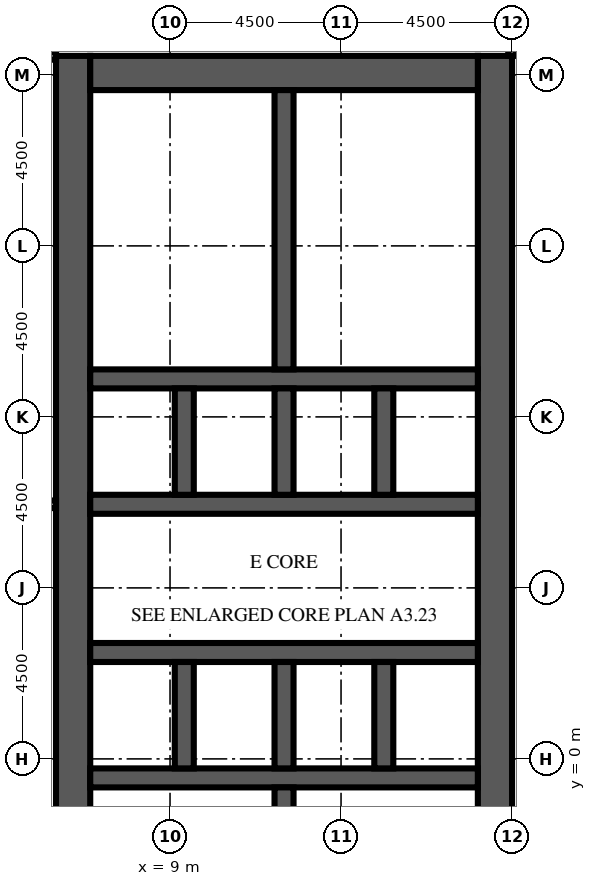
"""IFC4 building model, lengths in metres.
Left out: names, types, materials, properties, quantities, classifications, styles, units other than length and angle.
Written with IfcOpenShell. Run it as: python <this file> out.ifc"""

import sys

from ifc_helpers import new_model, si_unit, direction, frame, frame_2d, origin, place, context, subcontext, project, spatial, rectangle, extrude, element, fill, save


model = new_model("IFC4")
c1 = context("Model", 3, precision=1e-05, world=origin(), true_north=direction((0.0, 1.0)))
c2 = subcontext(c1, "Body", "Model", "MODEL_VIEW")
j1 = project(units=[si_unit("LENGTHUNIT", "METRE"), si_unit("PLANEANGLEUNIT", "RADIAN")], contexts=[c1])
p1 = place(None, origin())
s1 = spatial("IfcSite", under=j1, at=p1, CompositionType="ELEMENT")
p2 = place(p1, origin())
s2 = spatial("IfcBuilding", under=s1, at=p2, CompositionType="ELEMENT")
p3 = place(p2, frame((0.0, 0.0, 145.4)))
s3 = spatial("IfcBuildingStorey", under=s2, at=p3, CompositionType="ELEMENT", Elevation=145.4)
p4 = place(p3, frame((6.45, -9.0, 0.0), z_axis=(0.0, 0.0, 1.0), x_axis=(0.0, 1.0, 0.0)))
e1 = element("IfcWall", 1, at=p4, inside=s3, PredefinedType="SHEAR", context=c2, shape_type="SweptSolid", body=[
    extrude(rectangle(XDim=27.5, YDim=0.9, at=frame_2d((13.75, 0.0))), origin(), (0.0, 0.0, 1.0), 6.0),
])
p5 = place(p4, frame((12.55, 0.0, 0.0)))
e2 = element("IfcOpeningElement", 2, at=p5, cuts=e1, PredefinedType="OPENING", context=c2, shape_type="SweptSolid", body=[
    extrude(rectangle(XDim=2.4, YDim=2.4, at=frame_2d((1.2, 1.2))), frame((0.0, 0.46, 0.0), z_axis=(0.0, -1.0, 0.0), x_axis=(1.0, 0.0, 0.0)), (0.0, 0.0, 1.0), 0.92),
])
p6 = place(p4, frame((5.51, 0.0, 0.0)))
e3 = element("IfcOpeningElement", 3, at=p6, cuts=e1, PredefinedType="OPENING", context=c2, shape_type="SweptSolid", body=[
    extrude(rectangle(XDim=0.923, YDim=2.1, at=frame_2d((0.461, 1.05))), frame((0.0, 0.46, 0.0), z_axis=(0.0, -1.0, 0.0), x_axis=(1.0, 0.0, 0.0)), (0.0, 0.0, 1.0), 0.92),
])
p7 = place(p4, frame((23.427, 0.0, 0.0)))
e4 = element("IfcOpeningElement", 4, at=p7, cuts=e1, PredefinedType="OPENING", context=c2, shape_type="SweptSolid", body=[
    extrude(rectangle(XDim=1.2, YDim=2.1, at=frame_2d((0.6, 1.05))), frame((0.0, 0.46, 0.0), z_axis=(0.0, -1.0, 0.0), x_axis=(1.0, 0.0, 0.0)), (0.0, 0.0, 1.0), 0.92),
])
p8 = place(p3, frame((17.55, -9.0, 0.0), z_axis=(0.0, 0.0, 1.0), x_axis=(0.0, 1.0, 0.0)))
e5 = element("IfcWall", 5, at=p8, inside=s3, PredefinedType="SHEAR", context=c2, shape_type="SweptSolid", body=[
    extrude(rectangle(XDim=27.5, YDim=0.9, at=frame_2d((13.75, 0.0))), origin(), (0.0, 0.0, 1.0), 6.0),
])
p9 = place(p8, frame((12.55, 0.0, 0.0)))
e6 = element("IfcOpeningElement", 6, at=p9, cuts=e5, PredefinedType="OPENING", context=c2, shape_type="SweptSolid", body=[
    extrude(rectangle(XDim=2.4, YDim=2.4, at=frame_2d((1.2, 1.2))), frame((0.0, 0.46, 0.0), z_axis=(0.0, -1.0, 0.0), x_axis=(1.0, 0.0, 0.0)), (0.0, 0.0, 1.0), 0.92),
])
p10 = place(p8, frame((6.825, 0.0, 0.0)))
e7 = element("IfcOpeningElement", 7, at=p10, cuts=e5, PredefinedType="OPENING", context=c2, shape_type="SweptSolid", body=[
    extrude(rectangle(XDim=1.2, YDim=2.1, at=frame_2d((0.6, 1.05))), frame((0.0, 0.46, 0.0), z_axis=(0.0, -1.0, 0.0), x_axis=(1.0, 0.0, 0.0)), (0.0, 0.0, 1.0), 0.92),
])
p11 = place(p8, frame((19.475, 0.0, 0.0)))
e8 = element("IfcOpeningElement", 8, at=p11, cuts=e5, PredefinedType="OPENING", context=c2, shape_type="SweptSolid", body=[
    extrude(rectangle(XDim=1.2, YDim=2.1, at=frame_2d((0.6, 1.05))), frame((0.0, 0.46, 0.0), z_axis=(0.0, -1.0, 0.0), x_axis=(1.0, 0.0, 0.0)), (0.0, 0.0, 1.0), 0.92),
])
p12 = place(p3, frame((6.9, 18.05, 0.0), z_axis=(0.0, 0.0, 1.0), x_axis=(1.0, 0.0, 0.0)))
e9 = element("IfcWall", 9, at=p12, inside=s3, PredefinedType="SHEAR", context=c2, shape_type="SweptSolid", body=[
    extrude(rectangle(XDim=10.2, YDim=0.9, at=frame_2d((5.1, 0.0))), origin(), (0.0, 0.0, 1.0), 6.0),
])
p13 = place(p3, frame((6.9, -0.5, 0.0), z_axis=(0.0, 0.0, 1.0), x_axis=(1.0, 0.0, 0.0)))
e10 = element("IfcWall", 10, at=p13, inside=s3, PredefinedType="SHEAR", context=c2, shape_type="SweptSolid", body=[
    extrude(rectangle(XDim=10.2, YDim=0.5, at=frame_2d((5.1, 0.0))), origin(), (0.0, 0.0, 1.0), 6.0),
])
p14 = place(p3, frame((6.9, 2.8, 0.0), z_axis=(0.0, 0.0, 1.0), x_axis=(1.0, 0.0, 0.0)))
e11 = element("IfcWall", 11, at=p14, inside=s3, PredefinedType="SHEAR", context=c2, shape_type="SweptSolid", body=[
    extrude(rectangle(XDim=10.2, YDim=0.5, at=frame_2d((5.1, 0.0))), origin(), (0.0, 0.0, 1.0), 6.0),
])
p15 = place(p14, frame((0.562, 0.0, 0.0)))
e12 = element("IfcOpeningElement", 12, at=p15, cuts=e11, PredefinedType="OPENING", context=c2, shape_type="SweptSolid", body=[
    extrude(rectangle(XDim=1.1, YDim=2.1, at=frame_2d((0.55, 1.05))), frame((0.0, 0.26, 0.0), z_axis=(0.0, -1.0, 0.0), x_axis=(1.0, 0.0, 0.0)), (0.0, 0.0, 1.0), 0.52),
])
p16 = place(p14, frame((3.238, 0.0, 0.0)))
e13 = element("IfcOpeningElement", 13, at=p16, cuts=e11, PredefinedType="OPENING", context=c2, shape_type="SweptSolid", body=[
    extrude(rectangle(XDim=1.1, YDim=2.1, at=frame_2d((0.55, 1.05))), frame((0.0, 0.26, 0.0), z_axis=(0.0, -1.0, 0.0), x_axis=(1.0, 0.0, 0.0)), (0.0, 0.0, 1.0), 0.52),
])
p17 = place(p14, frame((8.538, 0.0, 0.0)))
e14 = element("IfcOpeningElement", 14, at=p17, cuts=e11, PredefinedType="OPENING", context=c2, shape_type="SweptSolid", body=[
    extrude(rectangle(XDim=1.1, YDim=2.1, at=frame_2d((0.55, 1.05))), frame((0.0, 0.26, 0.0), z_axis=(0.0, -1.0, 0.0), x_axis=(1.0, 0.0, 0.0)), (0.0, 0.0, 1.0), 0.52),
])
p18 = place(p3, frame((6.9, 6.7, 0.0), z_axis=(0.0, 0.0, 1.0), x_axis=(1.0, 0.0, 0.0)))
e15 = element("IfcWall", 15, at=p18, inside=s3, PredefinedType="SHEAR", context=c2, shape_type="SweptSolid", body=[
    extrude(rectangle(XDim=10.2, YDim=0.5, at=frame_2d((5.1, 0.0))), origin(), (0.0, 0.0, 1.0), 6.0),
])
p19 = place(p18, frame((0.562, 0.0, 0.0)))
e16 = element("IfcOpeningElement", 16, at=p19, cuts=e15, PredefinedType="OPENING", context=c2, shape_type="SweptSolid", body=[
    extrude(rectangle(XDim=1.1, YDim=2.1, at=frame_2d((0.55, 1.05))), frame((0.0, 0.26, 0.0), z_axis=(0.0, -1.0, 0.0), x_axis=(1.0, 0.0, 0.0)), (0.0, 0.0, 1.0), 0.52),
])
p20 = place(p18, frame((3.288, 0.0, 0.0)))
e17 = element("IfcOpeningElement", 17, at=p20, cuts=e15, PredefinedType="OPENING", context=c2, shape_type="SweptSolid", body=[
    extrude(rectangle(XDim=1.0, YDim=2.1, at=frame_2d((0.5, 1.05))), frame((0.0, 0.26, 0.0), z_axis=(0.0, -1.0, 0.0), x_axis=(1.0, 0.0, 0.0)), (0.0, 0.0, 1.0), 0.52),
])
p21 = place(p18, frame((5.913, 0.0, 0.0)))
e18 = element("IfcOpeningElement", 18, at=p21, cuts=e15, PredefinedType="OPENING", context=c2, shape_type="SweptSolid", body=[
    extrude(rectangle(XDim=1.0, YDim=2.1, at=frame_2d((0.5, 1.05))), frame((0.0, 0.26, 0.0), z_axis=(0.0, -1.0, 0.0), x_axis=(1.0, 0.0, 0.0)), (0.0, 0.0, 1.0), 0.52),
])
p22 = place(p18, frame((8.587, 0.0, 0.0)))
e19 = element("IfcOpeningElement", 19, at=p22, cuts=e15, PredefinedType="OPENING", context=c2, shape_type="SweptSolid", body=[
    extrude(rectangle(XDim=1.0, YDim=2.1, at=frame_2d((0.5, 1.05))), frame((0.0, 0.26, 0.0), z_axis=(0.0, -1.0, 0.0), x_axis=(1.0, 0.0, 0.0)), (0.0, 0.0, 1.0), 0.52),
])
p23 = place(p3, frame((6.9, 10.0, 0.0), z_axis=(0.0, 0.0, 1.0), x_axis=(1.0, 0.0, 0.0)))
e20 = element("IfcWall", 20, at=p23, inside=s3, PredefinedType="SHEAR", context=c2, shape_type="SweptSolid", body=[
    extrude(rectangle(XDim=10.2, YDim=0.5, at=frame_2d((5.1, 0.0))), origin(), (0.0, 0.0, 1.0), 6.0),
])
for number, where, z_axis, x_axis in (
    (21, (9.375, -0.25, 0.0), (0.0, 0.0, 1.0), (0.0, 1.0, 0.0)),
    (22, (9.375, 6.95, 0.0), (0.0, 0.0, 1.0), (0.0, 1.0, 0.0)),
    (23, (12.0, -0.25, 0.0), (0.0, 0.0, 1.0), (0.0, 1.0, 0.0)),
    (24, (12.0, 6.95, 0.0), (0.0, 0.0, 1.0), (0.0, 1.0, 0.0)),
    (25, (14.625, -0.25, 0.0), (0.0, 0.0, 1.0), (0.0, 1.0, 0.0)),
    (26, (14.625, 6.95, 0.0), (0.0, 0.0, 1.0), (0.0, 1.0, 0.0)),
):
    element("IfcWall", number, at=place(p3, frame(where, z_axis=z_axis, x_axis=x_axis)), inside=s3, PredefinedType="SHEAR", context=c2, shape_type="SweptSolid", body=[
        extrude(rectangle(XDim=2.8, YDim=0.5, at=frame_2d((1.4, 0.0))), origin(), (0.0, 0.0, 1.0), 6.0),
    ])
for number, where, z_axis, x_axis in (
    (27, (12.0, -8.1, 0.0), (0.0, 0.0, 1.0), (0.0, 1.0, 0.0)),
    (28, (12.0, 10.25, 0.0), (0.0, 0.0, 1.0), (0.0, 1.0, 0.0)),
):
    element("IfcWall", number, at=place(p3, frame(where, z_axis=z_axis, x_axis=x_axis)), inside=s3, PredefinedType="SHEAR", context=c2, shape_type="SweptSolid", body=[
        extrude(rectangle(XDim=7.35, YDim=0.5, at=frame_2d((3.675, 0.0))), origin(), (0.0, 0.0, 1.0), 6.0),
    ])
p24 = place(p3, frame((9.325, -2.367, 0.0), z_axis=(0.0, 0.0, 1.0), x_axis=(0.0, 1.0, 0.0)))
e29 = element("IfcWall", 29, at=p24, inside=s3, PredefinedType="PARTITIONING", context=c2, shape_type="SweptSolid", body=[
    extrude(rectangle(XDim=1.617, YDim=0.1, at=frame_2d((0.809, 0.0))), origin(), (0.0, 0.0, 1.0), 5.4),
])
p25 = place(p3, frame((6.9, 12.455, 0.0), z_axis=(0.0, 0.0, 1.0), x_axis=(1.0, 0.0, 0.0)))
e30 = element("IfcWall", 30, at=p25, inside=s3, PredefinedType="PARTITIONING", context=c2, shape_type="SweptSolid", body=[
    extrude(rectangle(XDim=1.3, YDim=0.1, at=frame_2d((0.65, 0.0))), origin(), (0.0, 0.0, 1.0), 5.4),
])
p26 = place(p25, frame((0.2, 0.0, 0.0)))
e31 = element("IfcOpeningElement", 31, at=p26, cuts=e30, PredefinedType="OPENING", context=c2, shape_type="SweptSolid", body=[
    extrude(rectangle(XDim=0.9, YDim=2.1, at=frame_2d((0.45, 1.05))), frame((0.0, 0.06, 0.0), z_axis=(0.0, -1.0, 0.0), x_axis=(1.0, 0.0, 0.0)), (0.0, 0.0, 1.0), 0.12),
])
p27 = place(p3, frame((8.2, 12.455, 0.0), z_axis=(0.0, 0.0, 1.0), x_axis=(1.0, 0.0, 0.0)))
e32 = element("IfcWall", 32, at=p27, inside=s3, PredefinedType="PARTITIONING", context=c2, shape_type="SweptSolid", body=[
    extrude(rectangle(XDim=3.55, YDim=0.1, at=frame_2d((1.775, 0.0))), origin(), (0.0, 0.0, 1.0), 5.4),
])
p28 = place(p3, frame((8.2, 12.455, 0.0), z_axis=(0.0, 0.0, 1.0), x_axis=(0.0, 1.0, 0.0)))
e33 = element("IfcWall", 33, at=p28, inside=s3, PredefinedType="PARTITIONING", context=c2, shape_type="SweptSolid", body=[
    extrude(rectangle(XDim=2.573, YDim=0.1, at=frame_2d((1.286, 0.0))), origin(), (0.0, 0.0, 1.0), 5.4),
])
p29 = place(p28, frame((0.786, 0.0, 0.0)))
e34 = element("IfcOpeningElement", 34, at=p29, cuts=e33, PredefinedType="OPENING", context=c2, shape_type="SweptSolid", body=[
    extrude(rectangle(XDim=1.0, YDim=2.1, at=frame_2d((0.5, 1.05))), frame((0.0, 0.06, 0.0), z_axis=(0.0, -1.0, 0.0), x_axis=(1.0, 0.0, 0.0)), (0.0, 0.0, 1.0), 0.12),
])
p30 = place(p3, frame((8.2, 15.028, 0.0), z_axis=(0.0, 0.0, 1.0), x_axis=(0.0, 1.0, 0.0)))
e35 = element("IfcWall", 35, at=p30, inside=s3, PredefinedType="PARTITIONING", context=c2, shape_type="SweptSolid", body=[
    extrude(rectangle(XDim=2.573, YDim=0.1, at=frame_2d((1.286, 0.0))), origin(), (0.0, 0.0, 1.0), 5.4),
])
p31 = place(p30, frame((0.786, 0.0, 0.0)))
e36 = element("IfcOpeningElement", 36, at=p31, cuts=e35, PredefinedType="OPENING", context=c2, shape_type="SweptSolid", body=[
    extrude(rectangle(XDim=1.0, YDim=2.1, at=frame_2d((0.5, 1.05))), frame((0.0, 0.06, 0.0), z_axis=(0.0, -1.0, 0.0), x_axis=(1.0, 0.0, 0.0)), (0.0, 0.0, 1.0), 0.12),
])
p32 = place(p3, frame((8.2, 15.028, 0.0), z_axis=(0.0, 0.0, 1.0), x_axis=(1.0, 0.0, 0.0)))
e37 = element("IfcWall", 37, at=p32, inside=s3, PredefinedType="PARTITIONING", context=c2, shape_type="SweptSolid", body=[
    extrude(rectangle(XDim=3.55, YDim=0.1, at=frame_2d((1.775, 0.0))), origin(), (0.0, 0.0, 1.0), 5.4),
])
p33 = place(p3, frame((18.0, 18.5, 0.0), z_axis=(0.0, 0.0, 1.0), x_axis=(0.0, 1.0, 0.0)))
e38 = element("IfcWall", 38, at=p33, inside=s3, PredefinedType="PARTITIONING", context=c2, shape_type="SweptSolid", body=[
    extrude(rectangle(XDim=3.3, YDim=0.2, at=frame_2d((1.65, 0.0))), origin(), (0.0, 0.0, 1.0), 5.4),
])
p34 = place(p3, frame((1.5, 6.7, 0.0), z_axis=(0.0, 0.0, 1.0), x_axis=(1.0, 0.0, 0.0)))
e39 = element("IfcWall", 39, at=p34, inside=s3, PredefinedType="PARTITIONING", context=c2, shape_type="SweptSolid", body=[
    extrude(rectangle(XDim=4.5, YDim=0.2, at=frame_2d((2.25, 0.0))), origin(), (0.0, 0.0, 1.0), 5.4),
])
p35 = place(p34, frame((1.6, 0.0, 0.0)))
e40 = element("IfcOpeningElement", 40, at=p35, cuts=e39, PredefinedType="OPENING", context=c2, shape_type="SweptSolid", body=[
    extrude(rectangle(XDim=1.0, YDim=2.1, at=frame_2d((0.5, 1.05))), frame((0.0, 0.11, 0.0), z_axis=(0.0, -1.0, 0.0), x_axis=(1.0, 0.0, 0.0)), (0.0, 0.0, 1.0), 0.22),
])
p36 = place(p3, frame((1.5, 18.5, 0.0), z_axis=(0.0, 0.0, 1.0), x_axis=(1.0, 0.0, 0.0)))
e41 = element("IfcWall", 41, at=p36, inside=s3, PredefinedType="PARTITIONING", context=c2, shape_type="SweptSolid", body=[
    extrude(rectangle(XDim=4.5, YDim=0.2, at=frame_2d((2.25, 0.0))), origin(), (0.0, 0.0, 1.0), 5.4),
])
p37 = place(p15, origin())
e42 = element("IfcDoor", 42, at=p37, inside=s3, OperationType="DOUBLE_DOOR_SLIDING", PredefinedType="DOOR", context=c2, shape_type="SweptSolid", body=[
    extrude(rectangle(XDim=1.1, YDim=2.1, at=frame_2d((0.55, 1.05))), frame((0.0, 0.025, 0.0), z_axis=(0.0, -1.0, 0.0), x_axis=(1.0, 0.0, 0.0)), (0.0, 0.0, 1.0), 0.05),
])
fill(e12, e42)
p38 = place(p16, origin())
e43 = element("IfcDoor", 43, at=p38, inside=s3, OperationType="DOUBLE_DOOR_SLIDING", PredefinedType="DOOR", context=c2, shape_type="SweptSolid", body=[
    extrude(rectangle(XDim=1.1, YDim=2.1, at=frame_2d((0.55, 1.05))), frame((0.0, 0.025, 0.0), z_axis=(0.0, -1.0, 0.0), x_axis=(1.0, 0.0, 0.0)), (0.0, 0.0, 1.0), 0.05),
])
fill(e13, e43)
p39 = place(p17, origin())
e44 = element("IfcDoor", 44, at=p39, inside=s3, OperationType="DOUBLE_DOOR_SLIDING", PredefinedType="DOOR", context=c2, shape_type="SweptSolid", body=[
    extrude(rectangle(XDim=1.1, YDim=2.1, at=frame_2d((0.55, 1.05))), frame((0.0, 0.025, 0.0), z_axis=(0.0, -1.0, 0.0), x_axis=(1.0, 0.0, 0.0)), (0.0, 0.0, 1.0), 0.05),
])
fill(e14, e44)
p40 = place(p19, origin())
e45 = element("IfcDoor", 45, at=p40, inside=s3, OperationType="DOUBLE_DOOR_SLIDING", PredefinedType="DOOR", context=c2, shape_type="SweptSolid", body=[
    extrude(rectangle(XDim=1.1, YDim=2.1, at=frame_2d((0.55, 1.05))), frame((0.0, 0.025, 0.0), z_axis=(0.0, -1.0, 0.0), x_axis=(1.0, 0.0, 0.0)), (0.0, 0.0, 1.0), 0.05),
])
fill(e16, e45)
p41 = place(p5, origin())
e46 = element("IfcDoor", 46, at=p41, inside=s3, OperationType="DOUBLE_DOOR_DOUBLE_SWING", PredefinedType="DOOR", context=c2, shape_type="SweptSolid", body=[
    extrude(rectangle(XDim=2.4, YDim=2.4, at=frame_2d((1.2, 1.2))), frame((0.0, 0.025, 0.0), z_axis=(0.0, -1.0, 0.0), x_axis=(1.0, 0.0, 0.0)), (0.0, 0.0, 1.0), 0.05),
])
fill(e2, e46)
p42 = place(p9, origin())
e47 = element("IfcDoor", 47, at=p42, inside=s3, OperationType="DOUBLE_DOOR_DOUBLE_SWING", PredefinedType="DOOR", context=c2, shape_type="SweptSolid", body=[
    extrude(rectangle(XDim=2.4, YDim=2.4, at=frame_2d((1.2, 1.2))), frame((0.0, 0.025, 0.0), z_axis=(0.0, -1.0, 0.0), x_axis=(1.0, 0.0, 0.0)), (0.0, 0.0, 1.0), 0.05),
])
fill(e6, e47)
p43 = place(p10, frame((1.2, 0.0, 0.0), z_axis=(0.0, 0.0, 1.0), x_axis=(-1.0, 0.0, 0.0)))
e48 = element("IfcDoor", 48, at=p43, inside=s3, OperationType="SINGLE_SWING_LEFT", PredefinedType="DOOR", context=c2, shape_type="SweptSolid", body=[
    extrude(rectangle(XDim=1.2, YDim=2.1, at=frame_2d((0.6, 1.05))), frame((0.0, 0.025, 0.0), z_axis=(0.0, -1.0, 0.0), x_axis=(1.0, 0.0, 0.0)), (0.0, 0.0, 1.0), 0.05),
])
fill(e7, e48)
p44 = place(p11, frame((1.2, 0.0, 0.0), z_axis=(0.0, 0.0, 1.0), x_axis=(-1.0, 0.0, 0.0)))
e49 = element("IfcDoor", 49, at=p44, inside=s3, OperationType="SINGLE_SWING_LEFT", PredefinedType="DOOR", context=c2, shape_type="SweptSolid", body=[
    extrude(rectangle(XDim=1.2, YDim=2.1, at=frame_2d((0.6, 1.05))), frame((0.0, 0.025, 0.0), z_axis=(0.0, -1.0, 0.0), x_axis=(1.0, 0.0, 0.0)), (0.0, 0.0, 1.0), 0.05),
])
fill(e8, e49)
p45 = place(p20, origin())
e50 = element("IfcDoor", 50, at=p45, inside=s3, OperationType="SINGLE_SWING_RIGHT", PredefinedType="DOOR", context=c2, shape_type="SweptSolid", body=[
    extrude(rectangle(XDim=1.0, YDim=2.1, at=frame_2d((0.5, 1.05))), frame((0.0, 0.025, 0.0), z_axis=(0.0, -1.0, 0.0), x_axis=(1.0, 0.0, 0.0)), (0.0, 0.0, 1.0), 0.05),
])
fill(e17, e50)
p46 = place(p21, origin())
e51 = element("IfcDoor", 51, at=p46, inside=s3, OperationType="SINGLE_SWING_LEFT", PredefinedType="DOOR", context=c2, shape_type="SweptSolid", body=[
    extrude(rectangle(XDim=1.0, YDim=2.1, at=frame_2d((0.5, 1.05))), frame((0.0, 0.025, 0.0), z_axis=(0.0, -1.0, 0.0), x_axis=(1.0, 0.0, 0.0)), (0.0, 0.0, 1.0), 0.05),
])
fill(e18, e51)
p47 = place(p22, origin())
e52 = element("IfcDoor", 52, at=p47, inside=s3, OperationType="SINGLE_SWING_RIGHT", PredefinedType="DOOR", context=c2, shape_type="SweptSolid", body=[
    extrude(rectangle(XDim=1.0, YDim=2.1, at=frame_2d((0.5, 1.05))), frame((0.0, 0.025, 0.0), z_axis=(0.0, -1.0, 0.0), x_axis=(1.0, 0.0, 0.0)), (0.0, 0.0, 1.0), 0.05),
])
fill(e19, e52)
p48 = place(p26, origin())
e53 = element("IfcDoor", 53, at=p48, inside=s3, OperationType="SINGLE_SWING_RIGHT", PredefinedType="DOOR", context=c2, shape_type="SweptSolid", body=[
    extrude(rectangle(XDim=0.9, YDim=2.1, at=frame_2d((0.45, 1.05))), frame((0.0, 0.025, 0.0), z_axis=(0.0, -1.0, 0.0), x_axis=(1.0, 0.0, 0.0)), (0.0, 0.0, 1.0), 0.05),
])
fill(e31, e53)
p49 = place(p7, origin())
e54 = element("IfcDoor", 54, at=p49, inside=s3, OperationType="SINGLE_SWING_LEFT", PredefinedType="DOOR", context=c2, shape_type="SweptSolid", body=[
    extrude(rectangle(XDim=1.2, YDim=2.1, at=frame_2d((0.6, 1.05))), frame((0.0, -0.375, 0.0), z_axis=(0.0, -1.0, 0.0), x_axis=(1.0, 0.0, 0.0)), (0.0, 0.0, 1.0), 0.05),
])
fill(e4, e54)
p50 = place(p29, origin())
e55 = element("IfcDoor", 55, at=p50, inside=s3, OperationType="SINGLE_SWING_RIGHT", PredefinedType="DOOR", context=c2, shape_type="SweptSolid", body=[
    extrude(rectangle(XDim=1.0, YDim=2.1, at=frame_2d((0.5, 1.05))), frame((0.0, 0.025, 0.0), z_axis=(0.0, -1.0, 0.0), x_axis=(1.0, 0.0, 0.0)), (0.0, 0.0, 1.0), 0.05),
])
fill(e34, e55)
p51 = place(p31, origin())
e56 = element("IfcDoor", 56, at=p51, inside=s3, OperationType="SINGLE_SWING_LEFT", PredefinedType="DOOR", context=c2, shape_type="SweptSolid", body=[
    extrude(rectangle(XDim=1.0, YDim=2.1, at=frame_2d((0.5, 1.05))), frame((0.0, 0.025, 0.0), z_axis=(0.0, -1.0, 0.0), x_axis=(1.0, 0.0, 0.0)), (0.0, 0.0, 1.0), 0.05),
])
fill(e36, e56)
save(model, sys.argv[1])
